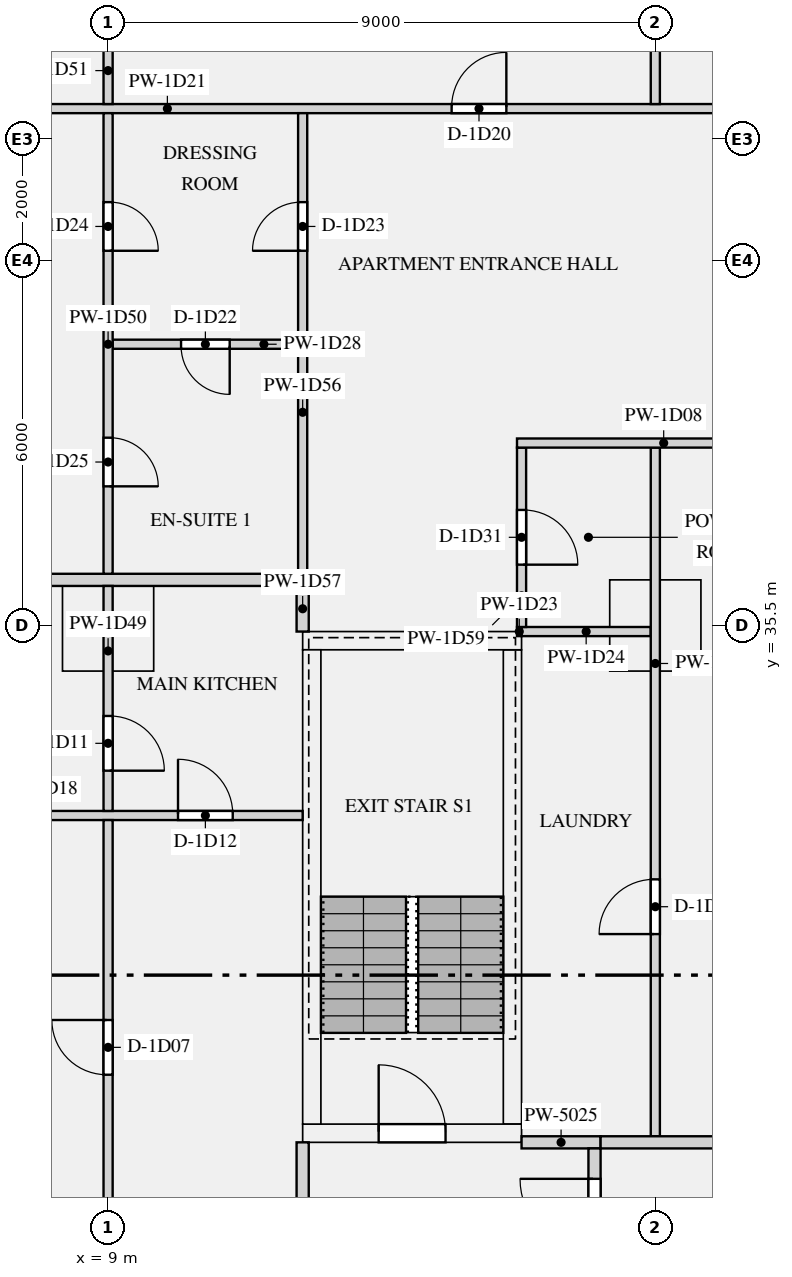
"""IFC4 building model, lengths in metres.
Left out: names, types, materials, properties, quantities, classifications, styles, units other than length and angle.
Written with IfcOpenShell. Run it as: python <this file> out.ifc"""

import sys

from ifc_helpers import new_model, si_unit, direction, frame, frame_2d, origin, origin_2d, place, context, subcontext, project, spatial, rectangle, extrude, element, fill, save


model = new_model("IFC4")
c1 = context("Model", 3, precision=1e-05, world=origin(), true_north=direction((0.0, 1.0)))
c2 = subcontext(c1, "Body", "Model", "MODEL_VIEW")
j1 = project(units=[si_unit("LENGTHUNIT", "METRE"), si_unit("PLANEANGLEUNIT", "RADIAN")], contexts=[c1])
p1 = place(None, origin())
s1 = spatial("IfcSite", under=j1, at=p1, CompositionType="ELEMENT")
p2 = place(p1, origin())
s2 = spatial("IfcBuilding", under=s1, at=p2, CompositionType="ELEMENT")
p3 = place(p2, frame((0.0, 0.0, 47.85)))
s3 = spatial("IfcBuildingStorey", under=s2, at=p3, CompositionType="ELEMENT", Elevation=47.85)
for number, where, z_axis, x_axis in (
    (1, (9.0, 35.5, 0.0), (0.0, 0.0, 1.0), (1.0, 0.0, 0.0)),
    (2, (18.0, 35.5, 0.0), (0.0, 0.0, 1.0), (1.0, 0.0, 0.0)),
):
    element("IfcColumn", number, at=place(p3, frame(where, z_axis=z_axis, x_axis=x_axis)), inside=s3, PredefinedType="COLUMN", context=c2, shape_type="SweptSolid", body=[
        extrude(rectangle(XDim=1.5, YDim=1.5, at=origin_2d()), origin(), (0.0, 0.0, 1.0), 3.15),
    ])
p4 = place(p3, frame((12.2, 27.15, 0.0), z_axis=(0.0, 0.0, 1.0), x_axis=(1.0, 0.0, 0.0)))
e3 = element("IfcWall", 3, at=p4, inside=s3, PredefinedType="SHEAR", context=c2, shape_type="SweptSolid", body=[
    extrude(rectangle(XDim=3.6, YDim=0.3, at=frame_2d((1.8, 0.0))), origin(), (0.0, 0.0, 1.0), 3.15),
])
p5 = place(p4, frame((1.25, 0.0, 0.0)))
e4 = element("IfcOpeningElement", 4, at=p5, cuts=e3, PredefinedType="OPENING", context=c2, shape_type="SweptSolid", body=[
    extrude(rectangle(XDim=1.1, YDim=2.1, at=frame_2d((0.55, 1.05))), frame((0.0, 0.16, 0.0), z_axis=(0.0, -1.0, 0.0), x_axis=(1.0, 0.0, 0.0)), (0.0, 0.0, 1.0), 0.32),
])
p6 = place(p3, frame((12.2, 35.25, 0.0), z_axis=(0.0, 0.0, 1.0), x_axis=(1.0, 0.0, 0.0)))
e5 = element("IfcWall", 5, at=p6, inside=s3, PredefinedType="SHEAR", context=c2, shape_type="SweptSolid", body=[
    extrude(rectangle(XDim=3.6, YDim=0.3, at=frame_2d((1.8, 0.0))), origin(), (0.0, 0.0, 1.0), 3.15),
])
for number, where, z_axis, x_axis in (
    (6, (12.35, 27.3, 0.0), (0.0, 0.0, 1.0), (0.0, 1.0, 0.0)),
    (7, (15.65, 27.3, 0.0), (0.0, 0.0, 1.0), (0.0, 1.0, 0.0)),
):
    element("IfcWall", number, at=place(p3, frame(where, z_axis=z_axis, x_axis=x_axis)), inside=s3, PredefinedType="SHEAR", context=c2, shape_type="SweptSolid", body=[
        extrude(rectangle(XDim=7.8, YDim=0.3, at=frame_2d((3.9, 0.0))), origin(), (0.0, 0.0, 1.0), 3.15),
    ])
p7 = place(p3, frame((15.8, 27.0, 0.0), z_axis=(0.0, 0.0, 1.0), x_axis=(1.0, 0.0, 0.0)))
e8 = element("IfcWall", 8, at=p7, inside=s3, PredefinedType="PARTITIONING", context=c2, shape_type="SweptSolid", body=[
    extrude(rectangle(XDim=1.3, YDim=0.2, at=frame_2d((0.65, 0.0))), origin(), (0.0, 0.0, 1.0), 2.83),
])
p8 = place(p3, frame((12.2, 23.1, 0.0), z_axis=(0.0, 0.0, 1.0), x_axis=(0.0, 1.0, 0.0)))
e9 = element("IfcWall", 9, at=p8, inside=s3, PredefinedType="PARTITIONING", context=c2, shape_type="SweptSolid", body=[
    extrude(rectangle(XDim=3.9, YDim=0.2, at=frame_2d((1.95, 0.0))), origin(), (0.0, 0.0, 1.0), 2.83),
])
p9 = place(p3, frame((17.0, 23.1, 0.0), z_axis=(0.0, 0.0, 1.0), x_axis=(0.0, 1.0, 0.0)))
e10 = element("IfcWall", 10, at=p9, inside=s3, PredefinedType="PARTITIONING", context=c2, shape_type="SweptSolid", body=[
    extrude(rectangle(XDim=3.8, YDim=0.2, at=frame_2d((1.9, 0.0))), origin(), (0.0, 0.0, 1.0), 2.83),
])
p10 = place(p9, frame((2.1, 0.0, 0.0)))
e11 = element("IfcOpeningElement", 11, at=p10, cuts=e10, PredefinedType="OPENING", context=c2, shape_type="SweptSolid", body=[
    extrude(rectangle(XDim=1.2, YDim=2.1, at=frame_2d((0.6, 1.05))), frame((0.0, 0.11, 0.0), z_axis=(0.0, -1.0, 0.0), x_axis=(1.0, 0.0, 0.0)), (0.0, 0.0, 1.0), 0.22),
])
p11 = place(p3, frame((17.1, 27.0, 0.0), z_axis=(0.0, 0.0, 1.0), x_axis=(1.0, 0.0, 0.0)))
e12 = element("IfcWall", 12, at=p11, inside=s3, PredefinedType="PARTITIONING", context=c2, shape_type="SweptSolid", body=[
    extrude(rectangle(XDim=7.0, YDim=0.2, at=frame_2d((3.5, 0.0))), origin(), (0.0, 0.0, 1.0), 2.83),
])
p12 = place(p3, frame((15.725, 38.5, 0.0), z_axis=(0.0, 0.0, 1.0), x_axis=(1.0, 0.0, 0.0)))
e13 = element("IfcWall", 13, at=p12, inside=s3, PredefinedType="PARTITIONING", context=c2, shape_type="SweptSolid", body=[
    extrude(rectangle(XDim=8.375, YDim=0.15, at=frame_2d((4.188, 0.0))), origin(), (0.0, 0.0, 1.0), 2.83),
])
p13 = place(p12, frame((4.825, 0.0, 0.0)))
e14 = element("IfcOpeningElement", 14, at=p13, cuts=e13, PredefinedType="OPENING", context=c2, shape_type="SweptSolid", body=[
    extrude(rectangle(XDim=0.9, YDim=2.1, at=frame_2d((0.45, 1.05))), frame((0.0, 0.085, 0.0), z_axis=(0.0, -1.0, 0.0), x_axis=(1.0, 0.0, 0.0)), (0.0, 0.0, 1.0), 0.17),
])
p14 = place(p3, frame((0.8, 32.375, 0.0), z_axis=(0.0, 0.0, 1.0), x_axis=(1.0, 0.0, 0.0)))
e15 = element("IfcWall", 15, at=p14, inside=s3, PredefinedType="PARTITIONING", context=c2, shape_type="SweptSolid", body=[
    extrude(rectangle(XDim=11.4, YDim=0.15, at=frame_2d((5.7, 0.0))), origin(), (0.0, 0.0, 1.0), 2.83),
])
p15 = place(p14, frame((3.275, 0.0, 0.0)))
e16 = element("IfcOpeningElement", 16, at=p15, cuts=e15, PredefinedType="OPENING", context=c2, shape_type="SweptSolid", body=[
    extrude(rectangle(XDim=1.5, YDim=2.1, at=frame_2d((0.75, 1.05))), frame((0.0, 0.085, 0.0), z_axis=(0.0, -1.0, 0.0), x_axis=(1.0, 0.0, 0.0)), (0.0, 0.0, 1.0), 0.17),
])
p16 = place(p14, frame((9.35, 0.0, 0.0)))
e17 = element("IfcOpeningElement", 17, at=p16, cuts=e15, PredefinedType="OPENING", context=c2, shape_type="SweptSolid", body=[
    extrude(rectangle(XDim=0.9, YDim=2.1, at=frame_2d((0.45, 1.05))), frame((0.0, 0.085, 0.0), z_axis=(0.0, -1.0, 0.0), x_axis=(1.0, 0.0, 0.0)), (0.0, 0.0, 1.0), 0.17),
])
p17 = place(p3, frame((0.8, 36.25, 0.0), z_axis=(0.0, 0.0, 1.0), x_axis=(1.0, 0.0, 0.0)))
e18 = element("IfcWall", 18, at=p17, inside=s3, PredefinedType="PARTITIONING", context=c2, shape_type="SweptSolid", body=[
    extrude(rectangle(XDim=11.475, YDim=0.2, at=frame_2d((5.737, 0.0))), origin(), (0.0, 0.0, 1.0), 2.83),
])
p18 = place(p3, frame((5.3, 44.0, 0.0), z_axis=(0.0, 0.0, 1.0), x_axis=(1.0, 0.0, 0.0)))
e19 = element("IfcWall", 19, at=p18, inside=s3, PredefinedType="PARTITIONING", context=c2, shape_type="SweptSolid", body=[
    extrude(rectangle(XDim=27.775, YDim=0.15, at=frame_2d((13.887, 0.0))), origin(), (0.0, 0.0, 1.0), 2.83),
])
p19 = place(p18, frame((14.5, 0.0, 0.0)))
e20 = element("IfcOpeningElement", 20, at=p19, cuts=e19, PredefinedType="OPENING", context=c2, shape_type="SweptSolid", body=[
    extrude(rectangle(XDim=0.9, YDim=2.1, at=frame_2d((0.45, 1.05))), frame((0.0, 0.085, 0.0), z_axis=(0.0, -1.0, 0.0), x_axis=(1.0, 0.0, 0.0)), (0.0, 0.0, 1.0), 0.17),
])
p20 = place(p18, frame((19.0, 0.0, 0.0)))
e21 = element("IfcOpeningElement", 21, at=p20, cuts=e19, PredefinedType="OPENING", context=c2, shape_type="SweptSolid", body=[
    extrude(rectangle(XDim=0.9, YDim=2.1, at=frame_2d((0.45, 1.05))), frame((0.0, 0.085, 0.0), z_axis=(0.0, -1.0, 0.0), x_axis=(1.0, 0.0, 0.0)), (0.0, 0.0, 1.0), 0.17),
])
p21 = place(p18, frame((9.35, 0.0, 0.0)))
e22 = element("IfcOpeningElement", 22, at=p21, cuts=e19, PredefinedType="OPENING", context=c2, shape_type="SweptSolid", body=[
    extrude(rectangle(XDim=0.9, YDim=2.1, at=frame_2d((0.45, 1.05))), frame((0.0, 0.085, 0.0), z_axis=(0.0, -1.0, 0.0), x_axis=(1.0, 0.0, 0.0)), (0.0, 0.0, 1.0), 0.17),
])
p22 = place(p18, frame((23.5, 0.0, 0.0)))
e23 = element("IfcOpeningElement", 23, at=p22, cuts=e19, PredefinedType="OPENING", context=c2, shape_type="SweptSolid", body=[
    extrude(rectangle(XDim=0.9, YDim=2.1, at=frame_2d((0.45, 1.05))), frame((0.0, 0.085, 0.0), z_axis=(0.0, -1.0, 0.0), x_axis=(1.0, 0.0, 0.0)), (0.0, 0.0, 1.0), 0.17),
])
p23 = place(p3, frame((15.725, 35.4, 0.0), z_axis=(0.0, 0.0, 1.0), x_axis=(1.0, 0.0, 0.0)))
e24 = element("IfcWall", 24, at=p23, inside=s3, PredefinedType="PARTITIONING", context=c2, shape_type="SweptSolid", body=[
    extrude(rectangle(XDim=0.075, YDim=0.15, at=frame_2d((0.038, 0.0))), origin(), (0.0, 0.0, 1.0), 2.83),
])
p24 = place(p3, frame((15.8, 35.4, 0.0), z_axis=(0.0, 0.0, 1.0), x_axis=(1.0, 0.0, 0.0)))
e25 = element("IfcWall", 25, at=p24, inside=s3, PredefinedType="PARTITIONING", context=c2, shape_type="SweptSolid", body=[
    extrude(rectangle(XDim=2.125, YDim=0.15, at=frame_2d((1.062, 0.0))), origin(), (0.0, 0.0, 1.0), 2.83),
])
p25 = place(p3, frame((9.075, 40.125, 0.0), z_axis=(0.0, 0.0, 1.0), x_axis=(1.0, 0.0, 0.0)))
e26 = element("IfcWall", 26, at=p25, inside=s3, PredefinedType="PARTITIONING", context=c2, shape_type="SweptSolid", body=[
    extrude(rectangle(XDim=3.05, YDim=0.15, at=frame_2d((1.525, 0.0))), origin(), (0.0, 0.0, 1.0), 2.83),
])
p26 = place(p25, frame((1.125, 0.0, 0.0)))
e27 = element("IfcOpeningElement", 27, at=p26, cuts=e26, PredefinedType="OPENING", context=c2, shape_type="SweptSolid", body=[
    extrude(rectangle(XDim=0.8, YDim=2.1, at=frame_2d((0.4, 1.05))), frame((0.0, 0.085, 0.0), z_axis=(0.0, -1.0, 0.0), x_axis=(1.0, 0.0, 0.0)), (0.0, 0.0, 1.0), 0.17),
])
p27 = place(p3, frame((18.0, 27.1, 0.0), z_axis=(0.0, 0.0, 1.0), x_axis=(0.0, 1.0, 0.0)))
e28 = element("IfcWall", 28, at=p27, inside=s3, PredefinedType="PARTITIONING", context=c2, shape_type="SweptSolid", body=[
    extrude(rectangle(XDim=11.325, YDim=0.15, at=frame_2d((5.663, 0.0))), origin(), (0.0, 0.0, 1.0), 2.83),
])
p28 = place(p27, frame((3.325, 0.0, 0.0)))
e29 = element("IfcOpeningElement", 29, at=p28, cuts=e28, PredefinedType="OPENING", context=c2, shape_type="SweptSolid", body=[
    extrude(rectangle(XDim=0.9, YDim=2.1, at=frame_2d((0.45, 1.05))), frame((0.0, 0.085, 0.0), z_axis=(0.0, -1.0, 0.0), x_axis=(1.0, 0.0, 0.0)), (0.0, 0.0, 1.0), 0.17),
])
p29 = place(p3, frame((18.0, 44.075, 0.0), z_axis=(0.0, 0.0, 1.0), x_axis=(0.0, 1.0, 0.0)))
e30 = element("IfcWall", 30, at=p29, inside=s3, PredefinedType="PARTITIONING", context=c2, shape_type="SweptSolid", body=[
    extrude(rectangle(XDim=3.625, YDim=0.15, at=frame_2d((1.812, 0.0))), origin(), (0.0, 0.0, 1.0), 2.83),
])
p30 = place(p3, frame((9.0, 12.575, 0.0), z_axis=(0.0, 0.0, 1.0), x_axis=(0.0, 1.0, 0.0)))
e31 = element("IfcWall", 31, at=p30, inside=s3, PredefinedType="PARTITIONING", context=c2, shape_type="SweptSolid", body=[
    extrude(rectangle(XDim=19.725, YDim=0.15, at=frame_2d((9.863, 0.0))), origin(), (0.0, 0.0, 1.0), 2.83),
])
p31 = place(p30, frame((15.537, 0.0, 0.0)))
e32 = element("IfcOpeningElement", 32, at=p31, cuts=e31, PredefinedType="OPENING", context=c2, shape_type="SweptSolid", body=[
    extrude(rectangle(XDim=0.9, YDim=2.1, at=frame_2d((0.45, 1.05))), frame((0.0, 0.085, 0.0), z_axis=(0.0, -1.0, 0.0), x_axis=(1.0, 0.0, 0.0)), (0.0, 0.0, 1.0), 0.17),
])
p32 = place(p30, frame((6.85, 0.0, 0.0)))
e33 = element("IfcOpeningElement", 33, at=p32, cuts=e31, PredefinedType="OPENING", context=c2, shape_type="SweptSolid", body=[
    extrude(rectangle(XDim=0.9, YDim=2.1, at=frame_2d((0.45, 1.05))), frame((0.0, 0.085, 0.0), z_axis=(0.0, -1.0, 0.0), x_axis=(1.0, 0.0, 0.0)), (0.0, 0.0, 1.0), 0.17),
])
p33 = place(p3, frame((9.0, 32.45, 0.0), z_axis=(0.0, 0.0, 1.0), x_axis=(0.0, 1.0, 0.0)))
e34 = element("IfcWall", 34, at=p33, inside=s3, PredefinedType="PARTITIONING", context=c2, shape_type="SweptSolid", body=[
    extrude(rectangle(XDim=3.7, YDim=0.15, at=frame_2d((1.85, 0.0))), origin(), (0.0, 0.0, 1.0), 2.83),
])
p34 = place(p33, frame((0.662, 0.0, 0.0)))
e35 = element("IfcOpeningElement", 35, at=p34, cuts=e34, PredefinedType="OPENING", context=c2, shape_type="SweptSolid", body=[
    extrude(rectangle(XDim=0.9, YDim=2.1, at=frame_2d((0.45, 1.05))), frame((0.0, 0.085, 0.0), z_axis=(0.0, -1.0, 0.0), x_axis=(1.0, 0.0, 0.0)), (0.0, 0.0, 1.0), 0.17),
])
p35 = place(p3, frame((9.0, 36.35, 0.0), z_axis=(0.0, 0.0, 1.0), x_axis=(0.0, 1.0, 0.0)))
e36 = element("IfcWall", 36, at=p35, inside=s3, PredefinedType="PARTITIONING", context=c2, shape_type="SweptSolid", body=[
    extrude(rectangle(XDim=7.575, YDim=0.15, at=frame_2d((3.788, 0.0))), origin(), (0.0, 0.0, 1.0), 2.83),
])
p36 = place(p35, frame((5.312, 0.0, 0.0)))
e37 = element("IfcOpeningElement", 37, at=p36, cuts=e36, PredefinedType="OPENING", context=c2, shape_type="SweptSolid", body=[
    extrude(rectangle(XDim=0.8, YDim=2.1, at=frame_2d((0.4, 1.05))), frame((0.0, 0.085, 0.0), z_axis=(0.0, -1.0, 0.0), x_axis=(1.0, 0.0, 0.0)), (0.0, 0.0, 1.0), 0.17),
])
p37 = place(p35, frame((1.438, 0.0, 0.0)))
e38 = element("IfcOpeningElement", 38, at=p37, cuts=e36, PredefinedType="OPENING", context=c2, shape_type="SweptSolid", body=[
    extrude(rectangle(XDim=0.8, YDim=2.1, at=frame_2d((0.4, 1.05))), frame((0.0, 0.085, 0.0), z_axis=(0.0, -1.0, 0.0), x_axis=(1.0, 0.0, 0.0)), (0.0, 0.0, 1.0), 0.17),
])
p38 = place(p3, frame((9.0, 44.075, 0.0), z_axis=(0.0, 0.0, 1.0), x_axis=(0.0, 1.0, 0.0)))
e39 = element("IfcWall", 39, at=p38, inside=s3, PredefinedType="PARTITIONING", context=c2, shape_type="SweptSolid", body=[
    extrude(rectangle(XDim=3.625, YDim=0.15, at=frame_2d((1.812, 0.0))), origin(), (0.0, 0.0, 1.0), 2.83),
])
p39 = place(p38, frame((1.1, 0.0, 0.0)))
e40 = element("IfcOpeningElement", 40, at=p39, cuts=e39, PredefinedType="OPENING", context=c2, shape_type="SweptSolid", body=[
    extrude(rectangle(XDim=1.5, YDim=2.1, at=frame_2d((0.75, 1.05))), frame((0.0, 0.085, 0.0), z_axis=(0.0, -1.0, 0.0), x_axis=(1.0, 0.0, 0.0)), (0.0, 0.0, 1.0), 0.17),
])
p40 = place(p3, frame((12.2, 36.35, 0.0), z_axis=(0.0, 0.0, 1.0), x_axis=(0.0, 1.0, 0.0)))
e41 = element("IfcWall", 41, at=p40, inside=s3, PredefinedType="PARTITIONING", context=c2, shape_type="SweptSolid", body=[
    extrude(rectangle(XDim=7.575, YDim=0.15, at=frame_2d((3.788, 0.0))), origin(), (0.0, 0.0, 1.0), 2.83),
])
p41 = place(p40, frame((5.312, 0.0, 0.0)))
e42 = element("IfcOpeningElement", 42, at=p41, cuts=e41, PredefinedType="OPENING", context=c2, shape_type="SweptSolid", body=[
    extrude(rectangle(XDim=0.8, YDim=2.1, at=frame_2d((0.4, 1.05))), frame((0.0, 0.085, 0.0), z_axis=(0.0, -1.0, 0.0), x_axis=(1.0, 0.0, 0.0)), (0.0, 0.0, 1.0), 0.17),
])
p42 = place(p3, frame((12.2, 35.4, 0.0), z_axis=(0.0, 0.0, 1.0), x_axis=(0.0, 1.0, 0.0)))
e43 = element("IfcWall", 43, at=p42, inside=s3, PredefinedType="PARTITIONING", context=c2, shape_type="SweptSolid", body=[
    extrude(rectangle(XDim=0.75, YDim=0.2, at=frame_2d((0.375, 0.0))), origin(), (0.0, 0.0, 1.0), 2.83),
])
p43 = place(p3, frame((15.8, 35.475, 0.0), z_axis=(0.0, 0.0, 1.0), x_axis=(0.0, 1.0, 0.0)))
e44 = element("IfcWall", 44, at=p43, inside=s3, PredefinedType="PARTITIONING", context=c2, shape_type="SweptSolid", body=[
    extrude(rectangle(XDim=2.95, YDim=0.15, at=frame_2d((1.475, 0.0))), origin(), (0.0, 0.0, 1.0), 2.83),
])
p44 = place(p43, frame((1.025, 0.0, 0.0)))
e45 = element("IfcOpeningElement", 45, at=p44, cuts=e44, PredefinedType="OPENING", context=c2, shape_type="SweptSolid", body=[
    extrude(rectangle(XDim=0.9, YDim=2.1, at=frame_2d((0.45, 1.05))), frame((0.0, 0.085, 0.0), z_axis=(0.0, -1.0, 0.0), x_axis=(1.0, 0.0, 0.0)), (0.0, 0.0, 1.0), 0.17),
])
p45 = place(p5, origin())
e46 = element("IfcDoor", 46, at=p45, inside=s3, OperationType="SINGLE_SWING_LEFT", PredefinedType="DOOR", context=c2, shape_type="SweptSolid", body=[
    extrude(rectangle(XDim=1.1, YDim=2.1, at=frame_2d((0.55, 1.05))), frame((0.0, 0.025, 0.0), z_axis=(0.0, -1.0, 0.0), x_axis=(1.0, 0.0, 0.0)), (0.0, 0.0, 1.0), 0.05),
])
fill(e4, e46)
p46 = place(p10, origin())
e47 = element("IfcDoor", 47, at=p46, inside=s3, OperationType="SINGLE_SWING_RIGHT", PredefinedType="DOOR", context=c2, shape_type="SweptSolid", body=[
    extrude(rectangle(XDim=1.2, YDim=2.1, at=frame_2d((0.6, 1.05))), frame((0.0, 0.025, 0.0), z_axis=(0.0, -1.0, 0.0), x_axis=(1.0, 0.0, 0.0)), (0.0, 0.0, 1.0), 0.05),
])
fill(e11, e47)
p47 = place(p31, origin())
e48 = element("IfcDoor", 48, at=p47, inside=s3, OperationType="SINGLE_SWING_RIGHT", PredefinedType="DOOR", context=c2, shape_type="SweptSolid", body=[
    extrude(rectangle(XDim=0.9, YDim=2.1, at=frame_2d((0.45, 1.05))), frame((0.0, 0.025, 0.0), z_axis=(0.0, -1.0, 0.0), x_axis=(1.0, 0.0, 0.0)), (0.0, 0.0, 1.0), 0.05),
])
fill(e32, e48)
p48 = place(p34, frame((0.9, 0.0, 0.0), z_axis=(0.0, 0.0, 1.0), x_axis=(-1.0, 0.0, 0.0)))
e49 = element("IfcDoor", 49, at=p48, inside=s3, OperationType="SINGLE_SWING_RIGHT", PredefinedType="DOOR", context=c2, shape_type="SweptSolid", body=[
    extrude(rectangle(XDim=0.9, YDim=2.1, at=frame_2d((0.45, 1.05))), frame((0.0, 0.025, 0.0), z_axis=(0.0, -1.0, 0.0), x_axis=(1.0, 0.0, 0.0)), (0.0, 0.0, 1.0), 0.05),
])
fill(e35, e49)
p49 = place(p16, origin())
e50 = element("IfcDoor", 50, at=p49, inside=s3, OperationType="SINGLE_SWING_LEFT", PredefinedType="DOOR", context=c2, shape_type="SweptSolid", body=[
    extrude(rectangle(XDim=0.9, YDim=2.1, at=frame_2d((0.45, 1.05))), frame((0.0, 0.025, 0.0), z_axis=(0.0, -1.0, 0.0), x_axis=(1.0, 0.0, 0.0)), (0.0, 0.0, 1.0), 0.05),
])
fill(e17, e50)
p50 = place(p21, origin())
e51 = element("IfcDoor", 51, at=p50, inside=s3, OperationType="SINGLE_SWING_RIGHT", PredefinedType="DOOR", context=c2, shape_type="SweptSolid", body=[
    extrude(rectangle(XDim=0.9, YDim=2.1, at=frame_2d((0.45, 1.05))), frame((0.0, 0.025, 0.0), z_axis=(0.0, -1.0, 0.0), x_axis=(1.0, 0.0, 0.0)), (0.0, 0.0, 1.0), 0.05),
])
fill(e22, e51)
p51 = place(p26, frame((0.8, 0.0, 0.0), z_axis=(0.0, 0.0, 1.0), x_axis=(-1.0, 0.0, 0.0)))
e52 = element("IfcDoor", 52, at=p51, inside=s3, OperationType="SINGLE_SWING_LEFT", PredefinedType="DOOR", context=c2, shape_type="SweptSolid", body=[
    extrude(rectangle(XDim=0.8, YDim=2.1, at=frame_2d((0.4, 1.05))), frame((0.0, 0.025, 0.0), z_axis=(0.0, -1.0, 0.0), x_axis=(1.0, 0.0, 0.0)), (0.0, 0.0, 1.0), 0.05),
])
fill(e27, e52)
p52 = place(p41, origin())
e53 = element("IfcDoor", 53, at=p52, inside=s3, OperationType="SINGLE_SWING_LEFT", PredefinedType="DOOR", context=c2, shape_type="SweptSolid", body=[
    extrude(rectangle(XDim=0.8, YDim=2.1, at=frame_2d((0.4, 1.05))), frame((0.0, 0.025, 0.0), z_axis=(0.0, -1.0, 0.0), x_axis=(1.0, 0.0, 0.0)), (0.0, 0.0, 1.0), 0.05),
])
fill(e42, e53)
p53 = place(p36, frame((0.8, 0.0, 0.0), z_axis=(0.0, 0.0, 1.0), x_axis=(-1.0, 0.0, 0.0)))
e54 = element("IfcDoor", 54, at=p53, inside=s3, OperationType="SINGLE_SWING_RIGHT", PredefinedType="DOOR", context=c2, shape_type="SweptSolid", body=[
    extrude(rectangle(XDim=0.8, YDim=2.1, at=frame_2d((0.4, 1.05))), frame((0.0, 0.025, 0.0), z_axis=(0.0, -1.0, 0.0), x_axis=(1.0, 0.0, 0.0)), (0.0, 0.0, 1.0), 0.05),
])
fill(e37, e54)
p54 = place(p37, frame((0.8, 0.0, 0.0), z_axis=(0.0, 0.0, 1.0), x_axis=(-1.0, 0.0, 0.0)))
e55 = element("IfcDoor", 55, at=p54, inside=s3, OperationType="SINGLE_SWING_RIGHT", PredefinedType="DOOR", context=c2, shape_type="SweptSolid", body=[
    extrude(rectangle(XDim=0.8, YDim=2.1, at=frame_2d((0.4, 1.05))), frame((0.0, 0.025, 0.0), z_axis=(0.0, -1.0, 0.0), x_axis=(1.0, 0.0, 0.0)), (0.0, 0.0, 1.0), 0.05),
])
fill(e38, e55)
p55 = place(p44, frame((0.9, 0.0, 0.0), z_axis=(0.0, 0.0, 1.0), x_axis=(-1.0, 0.0, 0.0)))
e56 = element("IfcDoor", 56, at=p55, inside=s3, OperationType="SINGLE_SWING_RIGHT", PredefinedType="DOOR", context=c2, shape_type="SweptSolid", body=[
    extrude(rectangle(XDim=0.9, YDim=2.1, at=frame_2d((0.45, 1.05))), frame((0.0, 0.025, 0.0), z_axis=(0.0, -1.0, 0.0), x_axis=(1.0, 0.0, 0.0)), (0.0, 0.0, 1.0), 0.05),
])
fill(e45, e56)
p56 = place(p28, origin())
e57 = element("IfcDoor", 57, at=p56, inside=s3, OperationType="SINGLE_SWING_LEFT", PredefinedType="DOOR", context=c2, shape_type="SweptSolid", body=[
    extrude(rectangle(XDim=0.9, YDim=2.1, at=frame_2d((0.45, 1.05))), frame((0.0, 0.025, 0.0), z_axis=(0.0, -1.0, 0.0), x_axis=(1.0, 0.0, 0.0)), (0.0, 0.0, 1.0), 0.05),
])
fill(e29, e57)
save(model, sys.argv[1])
